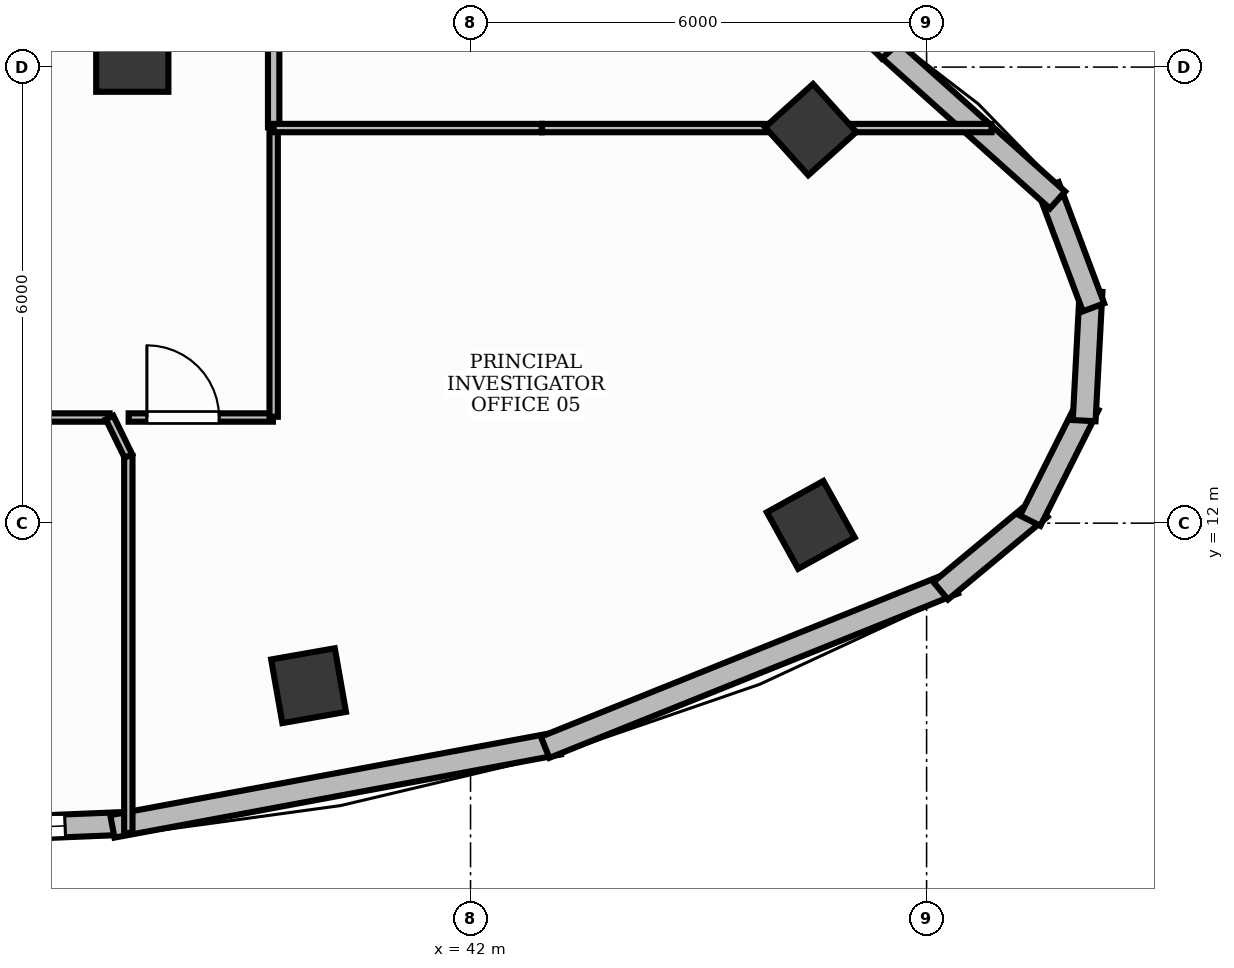
"""IFC4 building model, lengths in metres.
Left out: names, types, materials, properties, quantities, classifications, styles, units other than length and angle.
Written with IfcOpenShell. Run it as: python <this file> out.ifc"""

import sys

from ifc_helpers import new_model, si_unit, direction, frame, frame_2d, origin, origin_2d, place, context, subcontext, project, spatial, rectangle, extrude, element, fill, save


model = new_model("IFC4")
c1 = context("Model", 3, precision=1e-05, world=origin(), true_north=direction((0.0, 1.0)))
c2 = subcontext(c1, "Body", "Model", "MODEL_VIEW")
j1 = project(units=[si_unit("LENGTHUNIT", "METRE"), si_unit("PLANEANGLEUNIT", "RADIAN")], contexts=[c1])
p1 = place(None, origin())
s1 = spatial("IfcSite", under=j1, at=p1, CompositionType="ELEMENT")
p2 = place(p1, origin())
s2 = spatial("IfcBuilding", under=s1, at=p2, CompositionType="ELEMENT")
p3 = place(p2, frame((0.0, 0.0, 297.6)))
s3 = spatial("IfcBuildingStorey", under=s2, at=p3, CompositionType="ELEMENT", Elevation=297.6)
p4 = place(p3, frame((37.55, 18.15, -0.0), z_axis=(0.0, 0.0, 1.0), x_axis=(1.0, 0.0, 0.0)))
e1 = element("IfcColumn", 1, at=p4, inside=s3, PredefinedType="PILASTER", context=c2, shape_type="SweptSolid", body=[
    extrude(rectangle(XDim=0.95, YDim=0.95, at=origin_2d()), origin(), (0.0, 0.0, 1.0), 3.901),
])
for number, where, z_axis, x_axis in (
    (2, (39.869, 9.862, -0.0), (0.0, 0.0, 1.0), (0.985, 0.173, 0.0)),
    (3, (46.476, 11.977, -0.0), (0.0, 0.0, 1.0), (0.875, 0.485, 0.0)),
    (4, (46.475, 17.177, -0.0), (0.0, 0.0, 1.0), (-0.669, 0.743, 0.0)),
):
    element("IfcColumn", number, at=place(p3, frame(where, z_axis=z_axis, x_axis=x_axis)), inside=s3, PredefinedType="COLUMN", context=c2, shape_type="SweptSolid", body=[
        extrude(rectangle(XDim=0.85, YDim=0.85, at=origin_2d()), origin(), (0.0, 0.0, 1.0), 3.901),
    ])
p5 = place(p3, frame((34.388, 7.924, 0.0), z_axis=(0.0, 0.0, 1.0), x_axis=(0.999155735102, 0.041083050186, 0.0)))
e5 = element("IfcWall", 5, at=p5, inside=s3, PredefinedType="STANDARD", context=c2, shape_type="SweptSolid", body=[
    extrude(rectangle(XDim=3.061, YDim=0.3, at=frame_2d((1.53, 0.0))), origin(), (0.0, 0.0, 1.0), 3.9),
])
p6 = place(p5, frame((0.78, 0.0, 0.95)))
e6 = element("IfcOpeningElement", 6, at=p6, cuts=e5, PredefinedType="OPENING", context=c2, shape_type="SweptSolid", body=[
    extrude(rectangle(XDim=1.5, YDim=1.8, at=frame_2d((0.75, 0.9))), frame((0.0, 0.165, 0.0), z_axis=(0.0, -1.0, 0.0), x_axis=(1.0, 0.0, 0.0)), (0.0, 0.0, 1.0), 0.33),
])
p7 = place(p3, frame((37.288, 8.01, 0.0), z_axis=(0.0, 0.0, 1.0), x_axis=(0.983103205954, 0.183052141321, 0.0)))
e7 = element("IfcWall", 7, at=p7, inside=s3, PredefinedType="STANDARD", context=c2, shape_type="SweptSolid", body=[
    extrude(rectangle(XDim=5.974, YDim=0.3, at=frame_2d((2.987, 0.0))), origin(), (0.0, 0.0, 1.0), 3.9),
])
p8 = place(p3, frame((42.981, 9.052, 0.0), z_axis=(0.0, 0.0, 1.0), x_axis=(0.927771967192, 0.373147660978, 0.0)))
e8 = element("IfcWall", 8, at=p8, inside=s3, PredefinedType="STANDARD", context=c2, shape_type="SweptSolid", body=[
    extrude(rectangle(XDim=5.796, YDim=0.3, at=frame_2d((2.898, 0.0))), origin(), (0.0, 0.0, 1.0), 3.9),
])
for number, where, z_axis, x_axis in (
    (9, (48.185, 11.111, 0.0), (0.0, 0.0, 1.0), (0.769, 0.639, 0.0)),
    (10, (49.363, 12.032, 0.0), (0.0, 0.0, 1.0), (0.449, 0.894, 0.0)),
):
    element("IfcWall", number, at=place(p3, frame(where, z_axis=z_axis, x_axis=x_axis)), inside=s3, PredefinedType="STANDARD", context=c2, shape_type="SweptSolid", body=[
        extrude(rectangle(XDim=1.704, YDim=0.3, at=frame_2d((0.852, 0.0))), origin(), (0.0, 0.0, 1.0), 3.9),
    ])
for number, where, z_axis, x_axis in (
    (11, (50.073, 13.349, 0.0), (0.0, 0.0, 1.0), (0.053, 0.999, 0.0)),
    (12, (50.196, 14.839, 0.0), (0.0, 0.0, 1.0), (-0.351, 0.936, 0.0)),
):
    element("IfcWall", number, at=place(p3, frame(where, z_axis=z_axis, x_axis=x_axis)), inside=s3, PredefinedType="STANDARD", context=c2, shape_type="SweptSolid", body=[
        extrude(rectangle(XDim=1.704, YDim=0.3, at=frame_2d((0.852, 0.0))), origin(), (0.0, 0.0, 1.0), 3.9),
    ])
p9 = place(p3, frame((49.722, 16.251, 0.0), z_axis=(0.0, 0.0, 1.0), x_axis=(-0.744720921046, 0.667376018266, 0.0)))
e13 = element("IfcWall", 13, at=p9, inside=s3, PredefinedType="STANDARD", context=c2, shape_type="SweptSolid", body=[
    extrude(rectangle(XDim=3.094, YDim=0.3, at=frame_2d((1.547, 0.0))), origin(), (0.0, 0.0, 1.0), 3.9),
])
p10 = place(p3, frame((47.521, 18.213, 0.0), z_axis=(0.0, 0.0, 1.0), x_axis=(-0.669166006669, 0.743112949368, 0.0)))
e14 = element("IfcWall", 14, at=p10, inside=s3, PredefinedType="STANDARD", context=c2, shape_type="SweptSolid", body=[
    extrude(rectangle(XDim=2.948, YDim=0.3, at=frame_2d((1.474, 0.0))), origin(), (0.0, 0.0, 1.0), 3.9),
])
p11 = place(p3, frame((23.11, 13.39, 0.0), z_axis=(0.0, 0.0, 1.0), x_axis=(1.0, 0.0, 0.0)))
e15 = element("IfcWall", 15, at=p11, inside=s3, PredefinedType="MOVABLE", context=c2, shape_type="SweptSolid", body=[
    extrude(rectangle(XDim=14.141, YDim=0.11, at=frame_2d((7.071, 0.0))), origin(), (0.0, 0.0, 1.0), 2.22),
])
p12 = place(p11, frame((6.967, 0.0, 0.0)))
e16 = element("IfcOpeningElement", 16, at=p12, cuts=e15, PredefinedType="OPENING", context=c2, shape_type="SweptSolid", body=[
    extrude(rectangle(XDim=0.95, YDim=2.15, at=frame_2d((0.475, 1.075))), frame((0.0, 0.07, 0.0), z_axis=(0.0, -1.0, 0.0), x_axis=(1.0, 0.0, 0.0)), (0.0, 0.0, 1.0), 0.14),
])
p13 = place(p3, frame((37.502, 13.39, 0.0), z_axis=(0.0, 0.0, 1.0), x_axis=(1.0, 0.0, 0.0)))
e17 = element("IfcWall", 17, at=p13, inside=s3, PredefinedType="MOVABLE", context=c2, shape_type="SweptSolid", body=[
    extrude(rectangle(XDim=1.898, YDim=0.11, at=frame_2d((0.949, 0.0))), origin(), (0.0, 0.0, 1.0), 2.22),
])
p14 = place(p13, frame((0.24, 0.0, 0.0)))
e18 = element("IfcOpeningElement", 18, at=p14, cuts=e17, PredefinedType="OPENING", context=c2, shape_type="SweptSolid", body=[
    extrude(rectangle(XDim=0.95, YDim=2.15, at=frame_2d((0.475, 1.075))), frame((0.0, 0.07, 0.0), z_axis=(0.0, -1.0, 0.0), x_axis=(1.0, 0.0, 0.0)), (0.0, 0.0, 1.0), 0.14),
])
p15 = place(p3, frame((39.41, 17.208, 0.0), z_axis=(0.0, 0.0, 1.0), x_axis=(0.0, 1.0, 0.0)))
e19 = element("IfcWall", 19, at=p15, inside=s3, PredefinedType="PARTITIONING", context=c2, shape_type="SweptSolid", body=[
    extrude(rectangle(XDim=6.44, YDim=0.15, at=frame_2d((3.22, 0.0))), origin(), (0.0, 0.0, 1.0), 2.22),
])
p16 = place(p15, frame((4.024, 0.0, 0.0)))
e20 = element("IfcOpeningElement", 20, at=p16, cuts=e19, PredefinedType="OPENING", context=c2, shape_type="SweptSolid", body=[
    extrude(rectangle(XDim=0.95, YDim=2.15, at=frame_2d((0.475, 1.075))), frame((0.0, 0.09, 0.0), z_axis=(0.0, -1.0, 0.0), x_axis=(1.0, 0.0, 0.0)), (0.0, 0.0, 1.0), 0.18),
])
p17 = place(p3, frame((37.498, 12.884, 0.0), z_axis=(0.0, 0.0, 1.0), x_axis=(0.0, -1.0, 0.0)))
e21 = element("IfcWall", 21, at=p17, inside=s3, PredefinedType="MOVABLE", context=c2, shape_type="SweptSolid", body=[
    extrude(rectangle(XDim=4.959, YDim=0.11, at=frame_2d((2.479, 0.0))), origin(), (0.0, 0.0, 1.0), 2.22),
])
p18 = place(p3, frame((37.251, 13.39, 0.0), z_axis=(0.0, 0.0, 1.0), x_axis=(0.43868863299, -0.898639128508, 0.0)))
e22 = element("IfcWall", 22, at=p18, inside=s3, PredefinedType="MOVABLE", context=c2, shape_type="SweptSolid", body=[
    extrude(rectangle(XDim=0.563, YDim=0.11, at=frame_2d((0.281, 0.0))), origin(), (0.0, 0.0, 1.0), 2.22),
])
p19 = place(p3, frame((39.41, 13.4, 0.0), z_axis=(0.0, 0.0, 1.0), x_axis=(0.0, 1.0, 0.0)))
e23 = element("IfcWall", 23, at=p19, inside=s3, PredefinedType="MOVABLE", context=c2, shape_type="SweptSolid", body=[
    extrude(rectangle(XDim=3.798, YDim=0.11, at=frame_2d((1.899, 0.0))), origin(), (0.0, 0.0, 1.0), 2.22),
])
p20 = place(p3, frame((39.41, 17.198, 0.0), z_axis=(0.0, 0.0, 1.0), x_axis=(1.0, 0.0, 0.0)))
e24 = element("IfcWall", 24, at=p20, inside=s3, PredefinedType="MOVABLE", context=c2, shape_type="SweptSolid", body=[
    extrude(rectangle(XDim=3.525, YDim=0.11, at=frame_2d((1.762, 0.0))), origin(), (0.0, 0.0, 1.0), 2.22),
])
p21 = place(p3, frame((42.942, 17.198, 0.0), z_axis=(0.0, 0.0, 1.0), x_axis=(1.0, 0.0, 0.0)))
e25 = element("IfcWall", 25, at=p21, inside=s3, PredefinedType="MOVABLE", context=c2, shape_type="SweptSolid", body=[
    extrude(rectangle(XDim=5.913, YDim=0.11, at=frame_2d((2.957, 0.0))), origin(), (0.0, 0.0, 1.0), 2.22),
])
p22 = place(p6, origin())
e26 = element("IfcWindow", 26, at=p22, inside=s3, PartitioningType="DOUBLE_PANEL_VERTICAL", PredefinedType="WINDOW", context=c2, shape_type="SweptSolid", body=[
    extrude(rectangle(XDim=1.5, YDim=1.8, at=frame_2d((0.75, 0.9))), frame((0.0, 0.03, 0.0), z_axis=(0.0, -1.0, 0.0), x_axis=(1.0, 0.0, 0.0)), (0.0, 0.0, 1.0), 0.06),
])
fill(e6, e26)
p23 = place(p14, origin())
e27 = element("IfcDoor", 27, at=p23, inside=s3, OperationType="SINGLE_SWING_LEFT", PredefinedType="DOOR", context=c2, shape_type="SweptSolid", body=[
    extrude(rectangle(XDim=0.95, YDim=2.15, at=frame_2d((0.475, 1.075))), frame((0.0, 0.025, 0.0), z_axis=(0.0, -1.0, 0.0), x_axis=(1.0, 0.0, 0.0)), (0.0, 0.0, 1.0), 0.05),
])
fill(e18, e27)
save(model, sys.argv[1])
